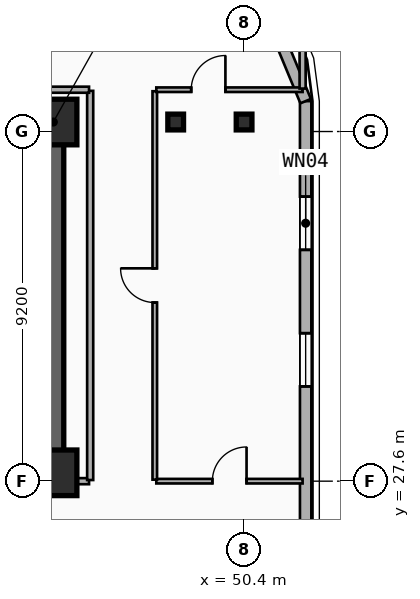
"""IFC4 building model, lengths in metres.
Left out: names, types, materials, properties, quantities, classifications, styles, units other than length and angle.
Written with IfcOpenShell. Run it as: python <this file> out.ifc"""

import sys

from ifc_helpers import new_model, si_unit, direction, frame, frame_2d, origin, origin_2d, place, context, subcontext, project, spatial, rectangle, i_section, extrude, element, fill, save


model = new_model("IFC4")
c1 = context("Model", 3, precision=1e-05, world=origin(), true_north=direction((0.0, 1.0)))
c2 = subcontext(c1, "Body", "Model", "MODEL_VIEW")
j1 = project(units=[si_unit("LENGTHUNIT", "METRE"), si_unit("PLANEANGLEUNIT", "RADIAN")], contexts=[c1])
p1 = place(None, origin())
s1 = spatial("IfcSite", under=j1, at=p1, CompositionType="ELEMENT")
p2 = place(p1, origin())
s2 = spatial("IfcBuilding", under=s1, at=p2, CompositionType="ELEMENT")
p3 = place(p2, frame((0.0, 0.0, 141.25)))
s3 = spatial("IfcBuildingStorey", under=s2, at=p3, CompositionType="ELEMENT", Elevation=141.25)
p4 = place(p3, frame((12.15, 37.05, 0.0), z_axis=(0.0, 0.0, 1.0), x_axis=(1.0, 0.0, 0.0)))
e1 = element("IfcWall", 1, at=p4, inside=s3, PredefinedType="SHEAR", context=c2, shape_type="SweptSolid", body=[
    extrude(rectangle(XDim=33.23, YDim=0.55, at=frame_2d((16.615, 0.0))), origin(), (0.0, 0.0, 1.0), 3.55),
])
p5 = place(p3, frame((45.38, 27.82, 0.0), z_axis=(0.0, 0.0, 1.0), x_axis=(-1.0, 0.0, 0.0)))
e2 = element("IfcWall", 2, at=p5, inside=s3, PredefinedType="SHEAR", context=c2, shape_type="SweptSolid", body=[
    extrude(rectangle(XDim=12.23, YDim=0.55, at=frame_2d((6.115, 0.0))), origin(), (0.0, 0.0, 1.0), 3.55),
])
p6 = place(p5, frame((9.93, 0.0, 0.0)))
e3 = element("IfcOpeningElement", 3, at=p6, cuts=e2, PredefinedType="OPENING", context=c2, shape_type="SweptSolid", body=[
    extrude(rectangle(XDim=1.1, YDim=2.15, at=frame_2d((0.55, 1.075))), frame((0.0, 0.285, 0.0), z_axis=(0.0, -1.0, 0.0), x_axis=(1.0, 0.0, 0.0)), (0.0, 0.0, 1.0), 0.57),
])
p7 = place(p5, frame((6.23, 0.0, 0.0)))
e4 = element("IfcOpeningElement", 4, at=p7, cuts=e2, PredefinedType="OPENING", context=c2, shape_type="SweptSolid", body=[
    extrude(rectangle(XDim=1.1, YDim=2.15, at=frame_2d((0.55, 1.075))), frame((0.0, 0.285, 0.0), z_axis=(0.0, -1.0, 0.0), x_axis=(1.0, 0.0, 0.0)), (0.0, 0.0, 1.0), 0.57),
])
p8 = place(p3, frame((45.38, 28.095, 0.0), z_axis=(0.0, 0.0, 1.0), x_axis=(0.0, 1.0, 0.0)))
e5 = element("IfcWall", 5, at=p8, inside=s3, PredefinedType="SHEAR", context=c2, shape_type="SweptSolid", body=[
    extrude(rectangle(XDim=8.68, YDim=0.55, at=frame_2d((4.34, 0.0))), origin(), (0.0, 0.0, 1.0), 3.55),
])
for number, where, z_axis, x_axis in (
    (6, (45.4, 27.82, 0.0), (0.0, 0.0, 1.0), (1.0, 0.0, 0.0)),
    (7, (45.4, 37.05, 0.0), (0.0, 0.0, 1.0), (1.0, 0.0, 0.0)),
):
    element("IfcColumn", number, at=place(p3, frame(where, z_axis=z_axis, x_axis=x_axis)), inside=s3, PredefinedType="COLUMN", context=c2, shape_type="SweptSolid", body=[
        extrude(rectangle(XDim=1.2, YDim=1.2, at=origin_2d()), origin(), (0.0, 0.0, 1.0), 3.55),
    ])
for number, where, z_axis, x_axis in (
    (8, (48.6, 37.05, 0.0), (0.0, 0.0, 1.0), (1.0, 0.0, 0.0)),
    (9, (50.4, 37.05, 0.0), (0.0, 0.0, 1.0), (1.0, 0.0, 0.0)),
):
    element("IfcColumn", number, at=place(p3, frame(where, z_axis=z_axis, x_axis=x_axis)), inside=s3, PredefinedType="COLUMN", context=c2, shape_type="SweptSolid", body=[
        extrude(i_section(OverallWidth=0.413, OverallDepth=0.415, WebThickness=0.03, FlangeThickness=0.047, FilletRadius=0.015, at=origin_2d()), origin(), (0.0, 0.0, 1.0), 3.55),
    ])
p9 = place(p3, frame((52.02, 37.6, 0.0), z_axis=(0.0, 0.0, 1.0), x_axis=(0.0, -1.0, 0.0)))
e10 = element("IfcWall", 10, at=p9, inside=s3, PredefinedType="SOLIDWALL", context=c2, shape_type="SweptSolid", body=[
    extrude(rectangle(XDim=23.0, YDim=0.3, at=frame_2d((11.5, 0.0))), origin(), (0.0, 0.0, 1.0), 3.29),
])
p10 = place(p9, frame((2.513, 0.0, 0.34)))
e11 = element("IfcOpeningElement", 11, at=p10, cuts=e10, PredefinedType="OPENING", context=c2, shape_type="SweptSolid", body=[
    extrude(rectangle(XDim=1.4, YDim=2.1, at=frame_2d((0.7, 1.05))), frame((0.0, 0.16, 0.0), z_axis=(0.0, -1.0, 0.0), x_axis=(1.0, 0.0, 0.0)), (0.0, 0.0, 1.0), 0.32),
])
p11 = place(p9, frame((6.107, 0.0, 0.34)))
e12 = element("IfcOpeningElement", 12, at=p11, cuts=e10, PredefinedType="OPENING", context=c2, shape_type="SweptSolid", body=[
    extrude(rectangle(XDim=1.4, YDim=2.1, at=frame_2d((0.7, 1.05))), frame((0.0, 0.16, 0.0), z_axis=(0.0, -1.0, 0.0), x_axis=(1.0, 0.0, 0.0)), (0.0, 0.0, 1.0), 0.32),
])
p12 = place(p9, frame((14.86, 0.0, 0.34)))
e13 = element("IfcOpeningElement", 13, at=p12, cuts=e10, PredefinedType="OPENING", context=c2, shape_type="SweptSolid", body=[
    extrude(rectangle(XDim=1.4, YDim=2.1, at=frame_2d((0.7, 1.05))), frame((0.0, 0.16, 0.0), z_axis=(0.0, -1.0, 0.0), x_axis=(1.0, 0.0, 0.0)), (0.0, 0.0, 1.0), 0.32),
])
p13 = place(p9, frame((18.77, 0.0, 0.34)))
e14 = element("IfcOpeningElement", 14, at=p13, cuts=e10, PredefinedType="OPENING", context=c2, shape_type="SweptSolid", body=[
    extrude(rectangle(XDim=1.4, YDim=2.1, at=frame_2d((0.7, 1.05))), frame((0.0, 0.16, 0.0), z_axis=(0.0, -1.0, 0.0), x_axis=(1.0, 0.0, 0.0)), (0.0, 0.0, 1.0), 0.32),
])
p14 = place(p3, frame((50.843, 40.443, 0.0), z_axis=(0.0, 0.0, 1.0), x_axis=(0.382704529509, -0.923870793506, 0.0)))
e15 = element("IfcWall", 15, at=p14, inside=s3, PredefinedType="SOLIDWALL", context=c2, shape_type="SweptSolid", body=[
    extrude(rectangle(XDim=3.077, YDim=0.3, at=frame_2d((1.538, 0.0))), origin(), (0.0, 0.0, 1.0), 3.29),
])
p15 = place(p3, frame((48.09, 27.6, 0.0), z_axis=(0.0, 0.0, 1.0), x_axis=(1.0, 0.0, 0.0)))
e16 = element("IfcWall", 16, at=p15, inside=s3, PredefinedType="PARTITIONING", context=c2, shape_type="SweptSolid", body=[
    extrude(rectangle(XDim=3.85, YDim=0.12, at=frame_2d((1.925, 0.0))), origin(), (0.0, 0.0, 1.0), 2.62),
])
p16 = place(p15, frame((1.475, 0.0, 0.0)))
e17 = element("IfcOpeningElement", 17, at=p16, cuts=e16, PredefinedType="OPENING", context=c2, shape_type="SweptSolid", body=[
    extrude(rectangle(XDim=0.9, YDim=2.1, at=frame_2d((0.45, 1.05))), frame((0.0, 0.07, 0.0), z_axis=(0.0, -1.0, 0.0), x_axis=(1.0, 0.0, 0.0)), (0.0, 0.0, 1.0), 0.14),
])
p17 = place(p3, frame((48.05, 27.64, 0.0), z_axis=(0.0, 0.0, 1.0), x_axis=(0.0, 1.0, 0.0)))
e18 = element("IfcWall", 18, at=p17, inside=s3, PredefinedType="PARTITIONING", context=c2, shape_type="SweptSolid", body=[
    extrude(rectangle(XDim=10.22, YDim=0.12, at=frame_2d((5.11, 0.0))), origin(), (0.0, 0.0, 1.0), 2.77),
])
p18 = place(p17, frame((4.66, 0.0, 0.0)))
e19 = element("IfcOpeningElement", 19, at=p18, cuts=e18, PredefinedType="OPENING", context=c2, shape_type="SweptSolid", body=[
    extrude(rectangle(XDim=0.9, YDim=2.1, at=frame_2d((0.45, 1.05))), frame((0.0, 0.07, 0.0), z_axis=(0.0, -1.0, 0.0), x_axis=(1.0, 0.0, 0.0)), (0.0, 0.0, 1.0), 0.14),
])
p19 = place(p3, frame((48.09, 37.9, 0.0), z_axis=(0.0, 0.0, 1.0), x_axis=(1.0, 0.0, 0.0)))
e20 = element("IfcWall", 20, at=p19, inside=s3, PredefinedType="PARTITIONING", context=c2, shape_type="SweptSolid", body=[
    extrude(rectangle(XDim=3.85, YDim=0.12, at=frame_2d((1.925, 0.0))), origin(), (0.0, 0.0, 1.0), 3.29),
])
p20 = place(p19, frame((0.919, 0.0, 0.0)))
e21 = element("IfcOpeningElement", 21, at=p20, cuts=e20, PredefinedType="OPENING", context=c2, shape_type="SweptSolid", body=[
    extrude(rectangle(XDim=0.9, YDim=2.1, at=frame_2d((0.45, 1.05))), frame((0.0, 0.07, 0.0), z_axis=(0.0, -1.0, 0.0), x_axis=(1.0, 0.0, 0.0)), (0.0, 0.0, 1.0), 0.14),
])
p21 = place(p3, frame((45.41, 27.6, 0.0), z_axis=(0.0, 0.0, 1.0), x_axis=(1.0, 0.0, 0.0)))
e22 = element("IfcWall", 22, at=p21, inside=s3, PredefinedType="PARTITIONING", context=c2, shape_type="SweptSolid", body=[
    extrude(rectangle(XDim=0.91, YDim=0.16, at=frame_2d((0.455, 0.0))), origin(), (0.0, 0.0, 1.0), 2.36),
])
p22 = place(p3, frame((46.35, 27.63, 0.0), z_axis=(0.0, 0.0, 1.0), x_axis=(0.0, 1.0, 0.0)))
e23 = element("IfcWall", 23, at=p22, inside=s3, PredefinedType="PARTITIONING", context=c2, shape_type="SweptSolid", body=[
    extrude(rectangle(XDim=10.24, YDim=0.16, at=frame_2d((5.12, 0.0))), origin(), (0.0, 0.0, 1.0), 2.77),
])
p23 = place(p3, frame((11.28, 37.9, 0.0), z_axis=(0.0, 0.0, 1.0), x_axis=(1.0, 0.0, 0.0)))
e24 = element("IfcWall", 24, at=p23, inside=s3, PredefinedType="PARTITIONING", context=c2, shape_type="SweptSolid", body=[
    extrude(rectangle(XDim=35.04, YDim=0.16, at=frame_2d((17.52, 0.0))), origin(), (0.0, 0.0, 1.0), 3.29),
])
p24 = place(p3, frame((51.94, 37.93, 0.0), z_axis=(0.0, 0.0, 1.0), x_axis=(0.0, 1.0, 0.0)))
e25 = element("IfcWall", 25, at=p24, inside=s3, PredefinedType="PARTITIONING", context=c2, shape_type="SweptSolid", body=[
    extrude(rectangle(XDim=1.44, YDim=0.16, at=frame_2d((0.72, 0.0))), origin(), (0.0, 0.0, 1.0), 3.29),
])
p25 = place(p10, origin())
e26 = element("IfcWindow", 26, at=p25, inside=s3, PartitioningType="SINGLE_PANEL", PredefinedType="WINDOW", context=c2, shape_type="SweptSolid", body=[
    extrude(rectangle(XDim=1.4, YDim=2.1, at=frame_2d((0.7, 1.05))), frame((0.0, 0.03, 0.0), z_axis=(0.0, -1.0, 0.0), x_axis=(1.0, 0.0, 0.0)), (0.0, 0.0, 1.0), 0.06),
])
fill(e11, e26)
p26 = place(p11, origin())
e27 = element("IfcWindow", 27, at=p26, inside=s3, PartitioningType="SINGLE_PANEL", PredefinedType="WINDOW", context=c2, shape_type="SweptSolid", body=[
    extrude(rectangle(XDim=1.4, YDim=2.1, at=frame_2d((0.7, 1.05))), frame((0.0, 0.03, 0.0), z_axis=(0.0, -1.0, 0.0), x_axis=(1.0, 0.0, 0.0)), (0.0, 0.0, 1.0), 0.06),
])
fill(e12, e27)
p27 = place(p16, origin())
e28 = element("IfcDoor", 28, at=p27, inside=s3, OperationType="SINGLE_SWING_RIGHT", PredefinedType="DOOR", context=c2, shape_type="SweptSolid", body=[
    extrude(rectangle(XDim=0.9, YDim=2.1, at=frame_2d((0.45, 1.05))), frame((0.0, 0.025, 0.0), z_axis=(0.0, -1.0, 0.0), x_axis=(1.0, 0.0, 0.0)), (0.0, 0.0, 1.0), 0.05),
])
fill(e17, e28)
p28 = place(p18, origin())
e29 = element("IfcDoor", 29, at=p28, inside=s3, OperationType="SINGLE_SWING_RIGHT", PredefinedType="DOOR", context=c2, shape_type="SweptSolid", body=[
    extrude(rectangle(XDim=0.9, YDim=2.1, at=frame_2d((0.45, 1.05))), frame((0.0, 0.025, 0.0), z_axis=(0.0, -1.0, 0.0), x_axis=(1.0, 0.0, 0.0)), (0.0, 0.0, 1.0), 0.05),
])
fill(e19, e29)
p29 = place(p20, origin())
e30 = element("IfcDoor", 30, at=p29, inside=s3, OperationType="SINGLE_SWING_RIGHT", PredefinedType="DOOR", context=c2, shape_type="SweptSolid", body=[
    extrude(rectangle(XDim=0.9, YDim=2.1, at=frame_2d((0.45, 1.05))), frame((0.0, 0.025, 0.0), z_axis=(0.0, -1.0, 0.0), x_axis=(1.0, 0.0, 0.0)), (0.0, 0.0, 1.0), 0.05),
])
fill(e21, e30)
save(model, sys.argv[1])
